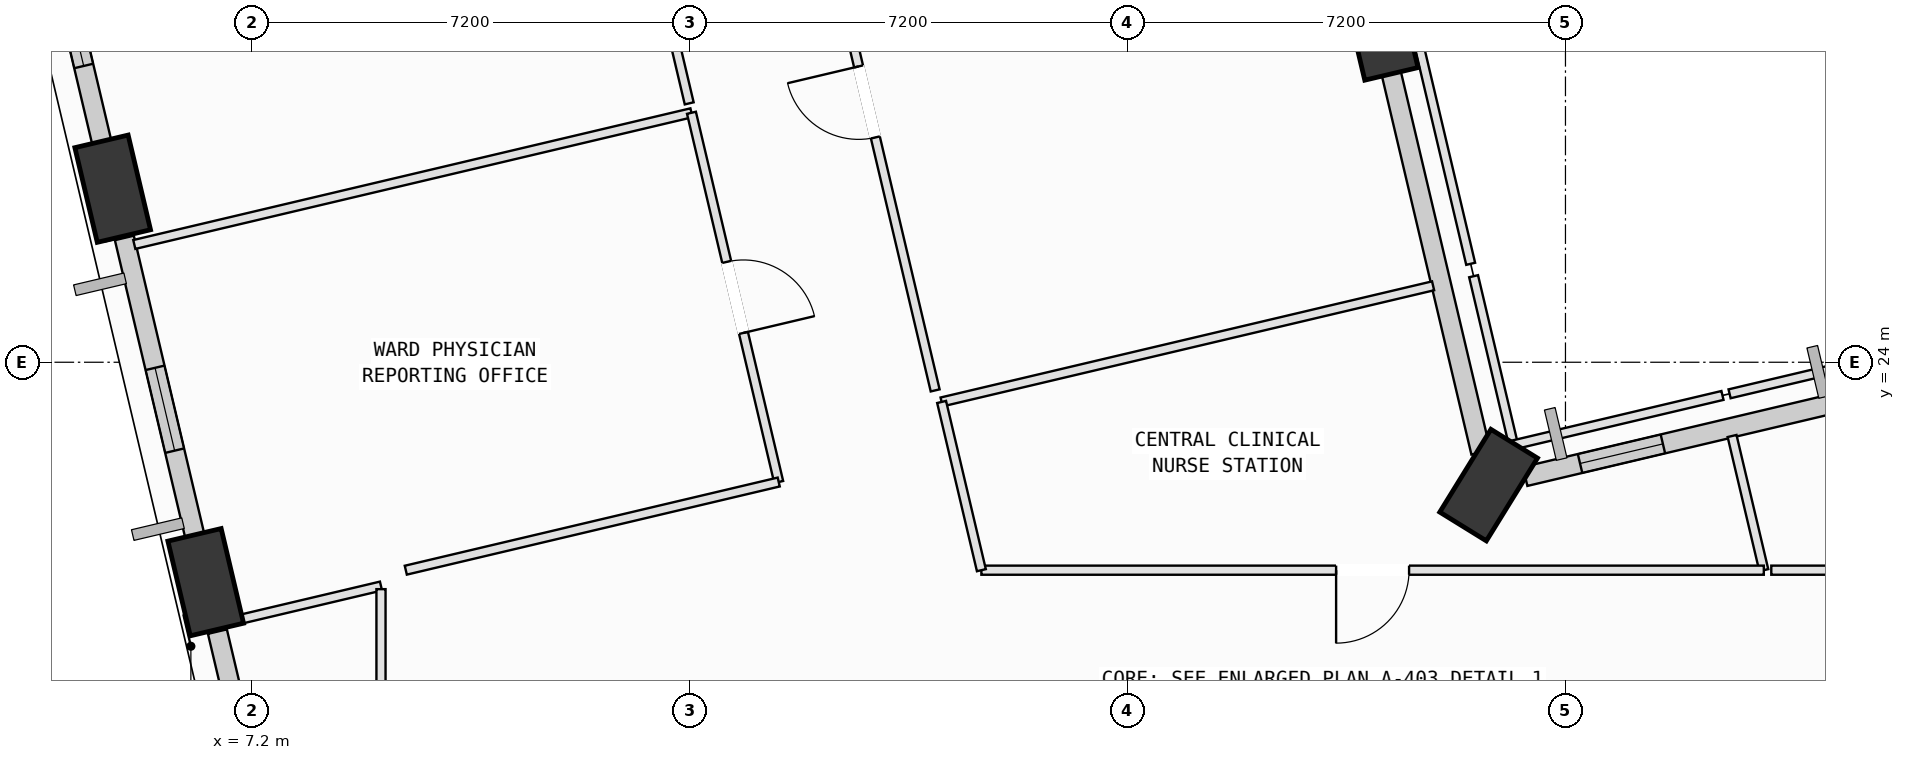
"""IFC4 building model, lengths in metres.
Left out: names, types, materials, properties, quantities, classifications, styles, units other than length and angle.
Written with IfcOpenShell. Run it as: python <this file> out.ifc"""

import sys

from ifc_helpers import new_model, si_unit, direction, frame, frame_2d, origin, origin_2d, place, context, subcontext, project, spatial, rectangle, extrude, element, fill, save


model = new_model("IFC4")
c1 = context("Model", 3, precision=1e-05, world=origin(), true_north=direction((0.0, 1.0)))
c2 = subcontext(c1, "Body", "Model", "MODEL_VIEW")
j1 = project(units=[si_unit("LENGTHUNIT", "METRE"), si_unit("PLANEANGLEUNIT", "RADIAN")], contexts=[c1])
p1 = place(None, origin())
s1 = spatial("IfcSite", under=j1, at=p1, CompositionType="ELEMENT")
p2 = place(p1, origin())
s2 = spatial("IfcBuilding", under=s1, at=p2, CompositionType="ELEMENT")
p3 = place(p2, frame((0.0, 0.0, 79.0)))
s3 = spatial("IfcBuildingStorey", under=s2, at=p3, CompositionType="ELEMENT", Elevation=79.0)
p4 = place(p3, frame((27.536, 21.979, 0.002), z_axis=(0.011862879742, -0.025016539145, 0.999616648948), x_axis=(0.110387943511, 0.993609384183, 0.023556179442)))
e1 = element("IfcColumn", 1, at=p4, inside=s3, PredefinedType="COLUMN", context=c2, shape_type="SweptSolid", body=[
    extrude(rectangle(XDim=1.6, YDim=0.9, at=origin_2d()), origin(), (0.0, 0.0, 1.0), 3.972),
])
p5 = place(p3, frame((25.753, 29.521, 0.002), z_axis=(-0.019332928217, -0.032693582431, 0.999278423441), x_axis=(0.296974112484, 0.954169844595, 0.036963281503)))
e2 = element("IfcColumn", 2, at=p5, inside=s3, PredefinedType="COLUMN", context=c2, shape_type="SweptSolid", body=[
    extrude(rectangle(XDim=1.6, YDim=0.9, at=origin_2d()), origin(), (0.0, 0.0, 1.0), 3.965),
])
p6 = place(p3, frame((4.908, 26.854, 0.002), z_axis=(-0.007475732598, -0.118178872823, 0.992964182355), x_axis=(-0.16858477636, 0.978927541895, 0.115239059779)))
e3 = element("IfcColumn", 3, at=p6, inside=s3, PredefinedType="COLUMN", context=c2, shape_type="SweptSolid", body=[
    extrude(rectangle(XDim=1.6, YDim=0.9, at=origin_2d()), origin(), (0.0, 0.0, 1.0), 3.919),
])
p7 = place(p3, frame((6.438, 20.383, 0.002), z_axis=(0.019115262304, -0.111702868317, 0.993557786924), x_axis=(-0.389846102073, 0.914252031556, 0.110287077643)))
e4 = element("IfcColumn", 4, at=p7, inside=s3, PredefinedType="COLUMN", context=c2, shape_type="SweptSolid", body=[
    extrude(rectangle(XDim=1.6, YDim=0.9, at=origin_2d()), origin(), (0.0, 0.0, 1.0), 3.921),
])
p8 = place(p3, frame((28.137, 22.121, 0.0), z_axis=(0.0, 0.0, 1.0), x_axis=(0.973179415544, 0.230047441111, 0.0)))
e5 = element("IfcWall", 5, at=p8, inside=s3, PredefinedType="SOLIDWALL", context=c2, shape_type="SweptSolid", body=[
    extrude(rectangle(XDim=5.736, YDim=0.32, at=frame_2d((2.868, 0.0))), origin(), (0.0, 0.0, 1.0), 3.085),
])
p9 = place(p8, frame((0.928, 0.0, 0.75)))
e6 = element("IfcOpeningElement", 6, at=p9, cuts=e5, PredefinedType="OPENING", context=c2, shape_type="SweptSolid", body=[
    extrude(rectangle(XDim=1.4, YDim=1.85, at=frame_2d((0.7, 0.925))), frame((0.0, 0.17, 0.0), z_axis=(0.0, -1.0, 0.0), x_axis=(1.0, 0.0, 0.0)), (0.0, 0.0, 1.0), 0.34),
])
p10 = place(p3, frame((27.409, 22.518, 0.0), z_axis=(0.0, 0.0, 1.0), x_axis=(-0.230053111414, 0.973178075138, 0.0)))
e7 = element("IfcWall", 7, at=p10, inside=s3, PredefinedType="SOLIDWALL", context=c2, shape_type="SweptSolid", body=[
    extrude(rectangle(XDim=6.536, YDim=0.32, at=frame_2d((3.268, 0.0))), origin(), (0.0, 0.0, 1.0), 2.785),
])
p11 = place(p3, frame((4.821, 27.22, 0.0), z_axis=(0.0, 0.0, 1.0), x_axis=(-0.230016890779, 0.973186636754, 0.0)))
e8 = element("IfcWall", 8, at=p11, inside=s3, PredefinedType="SOLIDWALL", context=c2, shape_type="SweptSolid", body=[
    extrude(rectangle(XDim=5.4, YDim=0.32, at=frame_2d((2.7, 0.0))), origin(), (0.0, 0.0, 1.0), 3.085),
])
p12 = place(p11, frame((1.698, 0.0, 0.75)))
e9 = element("IfcOpeningElement", 9, at=p12, cuts=e8, PredefinedType="OPENING", context=c2, shape_type="SweptSolid", body=[
    extrude(rectangle(XDim=2.0, YDim=1.95, at=frame_2d((1.0, 0.975))), frame((0.0, 0.17, 0.0), z_axis=(0.0, -1.0, 0.0), x_axis=(1.0, 0.0, 0.0)), (0.0, 0.0, 1.0), 0.34),
])
p13 = place(p3, frame((6.35, 20.753, 0.0), z_axis=(0.0, 0.0, 1.0), x_axis=(-0.230050193373, 0.973178764939, 0.0)))
e10 = element("IfcWall", 10, at=p13, inside=s3, PredefinedType="SOLIDWALL", context=c2, shape_type="SweptSolid", body=[
    extrude(rectangle(XDim=5.438, YDim=0.32, at=frame_2d((2.719, 0.0))), origin(), (0.0, 0.0, 1.0), 3.085),
])
p14 = place(p13, frame((1.843, 0.0, 0.75)))
e11 = element("IfcOpeningElement", 11, at=p14, cuts=e10, PredefinedType="OPENING", context=c2, shape_type="SweptSolid", body=[
    extrude(rectangle(XDim=1.4, YDim=1.85, at=frame_2d((0.7, 0.925))), frame((0.0, 0.17, 0.0), z_axis=(0.0, -1.0, 0.0), x_axis=(1.0, 0.0, 0.0)), (0.0, 0.0, 1.0), 0.34),
])
p15 = place(p3, frame((8.271, 12.625, 0.0), z_axis=(0.0, 0.0, 1.0), x_axis=(-0.230038414449, 0.97318154929, 0.0)))
e12 = element("IfcWall", 12, at=p15, inside=s3, PredefinedType="SOLIDWALL", context=c2, shape_type="SweptSolid", body=[
    extrude(rectangle(XDim=7.136, YDim=0.32, at=frame_2d((3.568, 0.0))), origin(), (0.0, 0.0, 1.0), 3.085),
])
p16 = place(p15, frame((2.669, 0.0, 0.75)))
e13 = element("IfcOpeningElement", 13, at=p16, cuts=e12, PredefinedType="OPENING", context=c2, shape_type="SweptSolid", body=[
    extrude(rectangle(XDim=1.8, YDim=2.05, at=frame_2d((0.9, 1.025))), frame((0.0, 0.17, 0.0), z_axis=(0.0, -1.0, 0.0), x_axis=(1.0, 0.0, 0.0)), (0.0, 0.0, 1.0), 0.34),
])
p17 = place(p3, frame((6.68, 19.695, 0.0), z_axis=(0.0, 0.0, 1.0), x_axis=(0.973185345339, 0.230022354604, 0.0)))
e14 = element("IfcWall", 14, at=p17, inside=s3, PredefinedType="PARTITIONING", context=c2, shape_type="SweptSolid", body=[
    extrude(rectangle(XDim=2.713, YDim=0.15, at=frame_2d((1.356, 0.0))), origin(), (0.0, 0.0, 1.0), 3.7),
])
p18 = place(p3, frame((9.32, 20.268, 0.0), z_axis=(0.0, 0.0, 1.0), x_axis=(0.0, -1.0, 0.0)))
e15 = element("IfcWall", 15, at=p18, inside=s3, PredefinedType="PARTITIONING", context=c2, shape_type="SweptSolid", body=[
    extrude(rectangle(XDim=4.991, YDim=0.15, at=frame_2d((2.496, 0.0))), origin(), (0.0, 0.0, 1.0), 3.7),
])
p19 = place(p18, frame((1.996, 0.0, 0.0)))
e16 = element("IfcOpeningElement", 16, at=p19, cuts=e15, PredefinedType="OPENING", context=c2, shape_type="SweptSolid", body=[
    extrude(rectangle(XDim=1.0, YDim=2.12, at=frame_2d((0.5, 1.06))), frame((0.0, 0.085, 0.0), z_axis=(0.0, -1.0, 0.0), x_axis=(1.0, 0.0, 0.0)), (0.0, 0.0, 1.0), 0.17),
])
p20 = place(p3, frame((6.344, 19.78, 0.0), z_axis=(0.0, 0.0, 1.0), x_axis=(-0.229629572874, 0.973278099652, 0.0)))
e17 = element("IfcWall", 17, at=p20, inside=s3, PredefinedType="PARTITIONING", context=c2, shape_type="SweptSolid", body=[
    extrude(rectangle(XDim=0.945, YDim=0.15, at=frame_2d((0.473, 0.0))), origin(), (0.0, 0.0, 1.0), 3.085),
])
p21 = place(p3, frame((5.263, 25.937, 0.0), z_axis=(0.0, 0.0, 1.0), x_axis=(0.973179969002, 0.230045099781, 0.0)))
e18 = element("IfcWall", 18, at=p21, inside=s3, PredefinedType="PARTITIONING", context=c2, shape_type="SweptSolid", body=[
    extrude(rectangle(XDim=9.416, YDim=0.15, at=frame_2d((4.708, 0.0))), origin(), (0.0, 0.0, 1.0), 3.7),
])
p22 = place(p3, frame((14.426, 28.103, 0.0), z_axis=(0.0, 0.0, 1.0), x_axis=(0.229968189108, -0.973198146319, 0.0)))
e19 = element("IfcWall", 19, at=p22, inside=s3, PredefinedType="PARTITIONING", context=c2, shape_type="SweptSolid", body=[
    extrude(rectangle(XDim=6.24, YDim=0.15, at=frame_2d((3.12, 0.0))), origin(), (0.0, 0.0, 1.0), 3.7),
])
p23 = place(p22, frame((2.52, 0.0, 0.0)))
e20 = element("IfcOpeningElement", 20, at=p23, cuts=e19, PredefinedType="OPENING", context=c2, shape_type="SweptSolid", body=[
    extrude(rectangle(XDim=1.2, YDim=2.15, at=frame_2d((0.6, 1.075))), frame((0.0, 0.085, 0.0), z_axis=(0.0, -1.0, 0.0), x_axis=(1.0, 0.0, 0.0)), (0.0, 0.0, 1.0), 0.17),
])
p24 = place(p3, frame((15.861, 22.03, 0.0), z_axis=(0.0, 0.0, 1.0), x_axis=(-0.973173259021, -0.230073483752, 0.0)))
e21 = element("IfcWall", 21, at=p24, inside=s3, PredefinedType="PARTITIONING", context=c2, shape_type="SweptSolid", body=[
    extrude(rectangle(XDim=6.302, YDim=0.15, at=frame_2d((3.151, 0.0))), origin(), (0.0, 0.0, 1.0), 3.7),
])
p25 = place(p3, frame((12.31, 37.056, 0.0), z_axis=(0.0, 0.0, 1.0), x_axis=(0.229958952192, -0.97320032897, 0.0)))
e22 = element("IfcWall", 22, at=p25, inside=s3, PredefinedType="PARTITIONING", context=c2, shape_type="SweptSolid", body=[
    extrude(rectangle(XDim=9.04, YDim=0.15, at=frame_2d((4.52, 0.0))), origin(), (0.0, 0.0, 1.0), 2.785),
])
p26 = place(p25, frame((3.92, 0.0, 0.0)))
e23 = element("IfcOpeningElement", 23, at=p26, cuts=e22, PredefinedType="OPENING", context=c2, shape_type="SweptSolid", body=[
    extrude(rectangle(XDim=1.2, YDim=2.15, at=frame_2d((0.6, 1.075))), frame((0.0, 0.085, 0.0), z_axis=(0.0, -1.0, 0.0), x_axis=(1.0, 0.0, 0.0)), (0.0, 0.0, 1.0), 0.17),
])
p27 = place(p3, frame((4.871, 26.008, 0.0), z_axis=(0.0, 0.0, 1.0), x_axis=(-0.230216073448, 0.973139537541, 0.0)))
e24 = element("IfcWall", 24, at=p27, inside=s3, PredefinedType="PARTITIONING", context=c2, shape_type="SweptSolid", body=[
    extrude(rectangle(XDim=1.191, YDim=0.15, at=frame_2d((0.595, 0.0))), origin(), (0.0, 0.0, 1.0), 3.085),
])
p28 = place(p3, frame((18.54, 23.347, 0.0), z_axis=(0.0, 0.0, 1.0), x_axis=(0.97319466158, 0.229982935611, 0.0)))
e25 = element("IfcWall", 25, at=p28, inside=s3, PredefinedType="PARTITIONING", context=c2, shape_type="SweptSolid", body=[
    extrude(rectangle(XDim=8.306, YDim=0.15, at=frame_2d((4.153, 0.0))), origin(), (0.0, 0.0, 1.0), 3.7),
])
p29 = place(p3, frame((27.289, 25.415, 0.0), z_axis=(0.0, 0.0, 1.0), x_axis=(0.230141967598, -0.973157065817, 0.0)))
e26 = element("IfcWall", 26, at=p29, inside=s3, PredefinedType="PARTITIONING", context=c2, shape_type="SweptSolid", body=[
    extrude(rectangle(XDim=2.85, YDim=0.15, at=frame_2d((1.425, 0.0))), origin(), (0.0, 0.0, 1.0), 3.7),
])
p30 = place(p3, frame((27.945, 22.641, 0.0), z_axis=(0.0, 0.0, 1.0), x_axis=(0.973146335826, 0.230187334728, 0.0)))
e27 = element("IfcWall", 27, at=p30, inside=s3, PredefinedType="PARTITIONING", context=c2, shape_type="SweptSolid", body=[
    extrude(rectangle(XDim=3.532, YDim=0.15, at=frame_2d((1.766, 0.0))), origin(), (0.0, 0.0, 1.0), 3.7),
])
p31 = place(p3, frame((31.54, 22.787, 0.0), z_axis=(0.0, 0.0, 1.0), x_axis=(0.230155211314, -0.973153933715, 0.0)))
e28 = element("IfcWall", 28, at=p31, inside=s3, PredefinedType="PARTITIONING", context=c2, shape_type="SweptSolid", body=[
    extrude(rectangle(XDim=2.268, YDim=0.15, at=frame_2d((1.134, 0.0))), origin(), (0.0, 0.0, 1.0), 3.7),
])
p32 = place(p3, frame((32.062, 20.58, 0.0), z_axis=(0.0, 0.0, 1.0), x_axis=(-1.0, 0.0, 0.0)))
e29 = element("IfcWall", 29, at=p32, inside=s3, PredefinedType="PARTITIONING", context=c2, shape_type="SweptSolid", body=[
    extrude(rectangle(XDim=12.868, YDim=0.15, at=frame_2d((6.434, 0.0))), origin(), (0.0, 0.0, 1.0), 3.7),
])
p33 = place(p32, frame((5.834, 0.0, 0.0)))
e30 = element("IfcOpeningElement", 30, at=p33, cuts=e29, PredefinedType="OPENING", context=c2, shape_type="SweptSolid", body=[
    extrude(rectangle(XDim=1.2, YDim=2.15, at=frame_2d((0.6, 1.075))), frame((0.0, 0.085, 0.0), z_axis=(0.0, -1.0, 0.0), x_axis=(1.0, 0.0, 0.0)), (0.0, 0.0, 1.0), 0.17),
])
p34 = place(p3, frame((19.194, 20.58, 0.0), z_axis=(0.0, 0.0, 1.0), x_axis=(-0.230049112819, 0.973179020372, 0.0)))
e31 = element("IfcWall", 31, at=p34, inside=s3, PredefinedType="PARTITIONING", context=c2, shape_type="SweptSolid", body=[
    extrude(rectangle(XDim=2.843, YDim=0.15, at=frame_2d((1.421, 0.0))), origin(), (0.0, 0.0, 1.0), 3.7),
])
p35 = place(p3, frame((38.0, 20.58, 0.0), z_axis=(0.0, 0.0, 1.0), x_axis=(-1.0, 0.0, 0.0)))
e32 = element("IfcWall", 32, at=p35, inside=s3, PredefinedType="PARTITIONING", context=c2, shape_type="SweptSolid", body=[
    extrude(rectangle(XDim=5.815, YDim=0.15, at=frame_2d((2.907, 0.0))), origin(), (0.0, 0.0, 1.0), 3.285),
])
p36 = place(p3, frame((31.499, 23.481, 0.0), z_axis=(0.0, 0.0, 1.0), x_axis=(0.973176783589, 0.230058574897, 0.0)))
e33 = element("IfcWall", 33, at=p36, inside=s3, PredefinedType="PARTITIONING", context=c2, shape_type="SweptSolid", body=[
    extrude(rectangle(XDim=15.231, YDim=0.15, at=frame_2d((7.616, 0.0))), origin(), (0.0, 0.0, 1.0), 3.085),
])
p37 = place(p3, frame((18.434, 23.537, 0.0), z_axis=(0.0, 0.0, 1.0), x_axis=(-0.23006080979, 0.973176255258, 0.0)))
e34 = element("IfcWall", 34, at=p37, inside=s3, PredefinedType="PARTITIONING", context=c2, shape_type="SweptSolid", body=[
    extrude(rectangle(XDim=9.75, YDim=0.15, at=frame_2d((4.875, 0.0))), origin(), (0.0, 0.0, 1.0), 3.7),
])
p38 = place(p37, frame((4.275, 0.0, 0.0)))
e35 = element("IfcOpeningElement", 35, at=p38, cuts=e34, PredefinedType="OPENING", context=c2, shape_type="SweptSolid", body=[
    extrude(rectangle(XDim=1.2, YDim=2.15, at=frame_2d((0.6, 1.075))), frame((0.0, 0.085, 0.0), z_axis=(0.0, -1.0, 0.0), x_axis=(1.0, 0.0, 0.0)), (0.0, 0.0, 1.0), 0.17),
])
p39 = place(p3, frame((24.998, 35.108, 0.0), z_axis=(0.0, 0.0, 1.0), x_axis=(0.230031490205, -0.973183186001, 0.0)))
e36 = element("IfcWall", 36, at=p39, inside=s3, PredefinedType="PARTITIONING", context=c2, shape_type="SweptSolid", body=[
    extrude(rectangle(XDim=9.75, YDim=0.15, at=frame_2d((4.875, 0.0))), origin(), (0.0, 0.0, 1.0), 3.7),
])
p40 = place(p9, origin())
e37 = element("IfcWindow", 37, at=p40, inside=s3, PartitioningType="SINGLE_PANEL", PredefinedType="WINDOW", context=c2, shape_type="SweptSolid", body=[
    extrude(rectangle(XDim=1.4, YDim=1.85, at=frame_2d((0.7, 0.925))), frame((0.0, 0.03, 0.0), z_axis=(0.0, -1.0, 0.0), x_axis=(1.0, 0.0, 0.0)), (0.0, 0.0, 1.0), 0.06),
])
fill(e6, e37)
p41 = place(p12, origin())
e38 = element("IfcWindow", 38, at=p41, inside=s3, PartitioningType="SINGLE_PANEL", PredefinedType="WINDOW", context=c2, shape_type="SweptSolid", body=[
    extrude(rectangle(XDim=2.0, YDim=1.95, at=frame_2d((1.0, 0.975))), frame((0.0, 0.03, 0.0), z_axis=(0.0, -1.0, 0.0), x_axis=(1.0, 0.0, 0.0)), (0.0, 0.0, 1.0), 0.06),
])
fill(e9, e38)
p42 = place(p14, origin())
e39 = element("IfcWindow", 39, at=p42, inside=s3, PartitioningType="SINGLE_PANEL", PredefinedType="WINDOW", context=c2, shape_type="SweptSolid", body=[
    extrude(rectangle(XDim=1.4, YDim=1.85, at=frame_2d((0.7, 0.925))), frame((0.0, 0.03, 0.0), z_axis=(0.0, -1.0, 0.0), x_axis=(1.0, 0.0, 0.0)), (0.0, 0.0, 1.0), 0.06),
])
fill(e11, e39)
p43 = place(p23, origin())
e40 = element("IfcDoor", 40, at=p43, inside=s3, OperationType="SINGLE_SWING_RIGHT", PredefinedType="DOOR", context=c2, shape_type="SweptSolid", body=[
    extrude(rectangle(XDim=1.2, YDim=2.15, at=frame_2d((0.6, 1.075))), frame((0.0, 0.025, 0.0), z_axis=(0.0, -1.0, 0.0), x_axis=(1.0, 0.0, 0.0)), (0.0, 0.0, 1.0), 0.05),
])
fill(e20, e40)
p44 = place(p33, origin())
e41 = element("IfcDoor", 41, at=p44, inside=s3, OperationType="SINGLE_SWING_RIGHT", PredefinedType="DOOR", context=c2, shape_type="SweptSolid", body=[
    extrude(rectangle(XDim=1.2, YDim=2.15, at=frame_2d((0.6, 1.075))), frame((0.0, 0.025, 0.0), z_axis=(0.0, -1.0, 0.0), x_axis=(1.0, 0.0, 0.0)), (0.0, 0.0, 1.0), 0.05),
])
fill(e30, e41)
p45 = place(p38, origin())
e42 = element("IfcDoor", 42, at=p45, inside=s3, OperationType="SINGLE_SWING_RIGHT", PredefinedType="DOOR", context=c2, shape_type="SweptSolid", body=[
    extrude(rectangle(XDim=1.2, YDim=2.15, at=frame_2d((0.6, 1.075))), frame((0.0, 0.025, 0.0), z_axis=(0.0, -1.0, 0.0), x_axis=(1.0, 0.0, 0.0)), (0.0, 0.0, 1.0), 0.05),
])
fill(e35, e42)
save(model, sys.argv[1])
